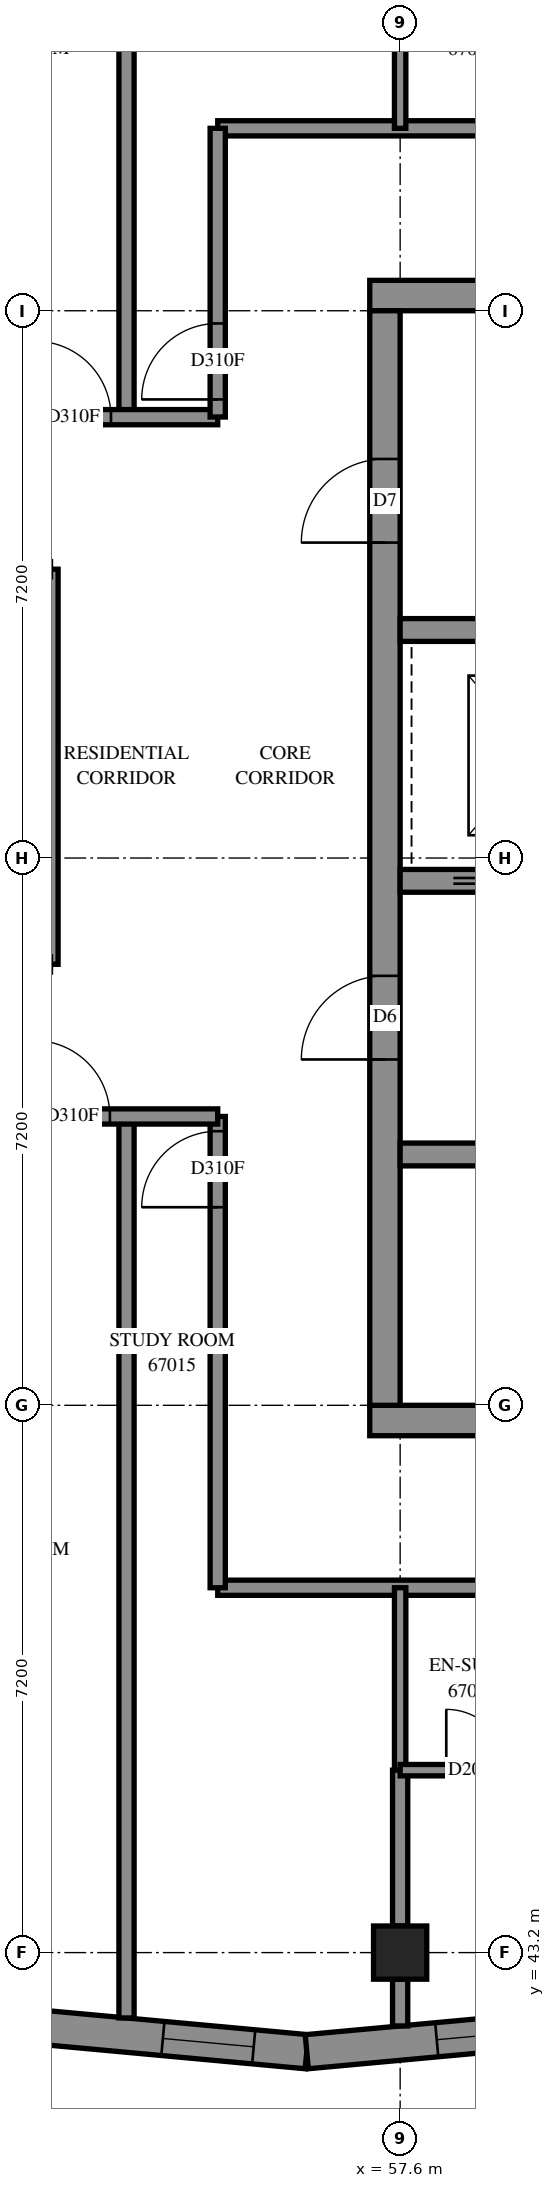
"""IFC4 building model, lengths in metres.
Left out: names, types, materials, properties, quantities, classifications, styles, units other than length and angle.
Written with IfcOpenShell. Run it as: python <this file> out.ifc"""

import sys

from ifc_helpers import new_model, si_unit, direction, frame, frame_2d, origin, origin_2d, place, context, subcontext, project, spatial, polyline, rectangle, outline, extrude, element, fill, save


model = new_model("IFC4")
c1 = context("Model", 3, precision=1e-05, world=origin(), true_north=direction((0.0, 1.0)))
c2 = subcontext(c1, "Body", "Model", "MODEL_VIEW")
j1 = project(units=[si_unit("LENGTHUNIT", "METRE"), si_unit("PLANEANGLEUNIT", "RADIAN")], contexts=[c1])
p1 = place(None, origin())
s1 = spatial("IfcSite", under=j1, at=p1, CompositionType="ELEMENT")
p2 = place(p1, origin())
s2 = spatial("IfcBuilding", under=s1, at=p2, CompositionType="ELEMENT")
p3 = place(p2, frame((0.0, 0.0, 247.2)))
s3 = spatial("IfcBuildingStorey", under=s2, at=p3, CompositionType="ELEMENT", Elevation=247.2)
p4 = place(p3, frame((57.6, 43.2, 0.0), z_axis=(0.0, 0.0, 1.0), x_axis=(1.0, 0.0, 0.0)))
e1 = element("IfcColumn", 1, at=p4, inside=s3, PredefinedType="COLUMN", context=c2, shape_type="SweptSolid", body=[
    extrude(rectangle(XDim=0.7, YDim=0.7, at=origin_2d()), origin(), (0.0, 0.0, 1.0), 3.1),
])
p5 = place(p3, frame((57.2, 50.2, -0.3), z_axis=(0.0, 0.0, 1.0), x_axis=(1.0, 0.0, 0.0)))
e2 = element("IfcWall", 2, at=p5, inside=s3, PredefinedType="SHEAR", context=c2, shape_type="SweptSolid", body=[
    extrude(rectangle(XDim=15.2, YDim=0.4, at=frame_2d((7.6, 0.0))), origin(), (0.0, 0.0, 1.0), 2.7),
])
p6 = place(p3, frame((57.2, 65.0, -0.3), z_axis=(0.0, 0.0, 1.0), x_axis=(1.0, 0.0, 0.0)))
e3 = element("IfcWall", 3, at=p6, inside=s3, PredefinedType="SHEAR", context=c2, shape_type="SweptSolid", body=[
    extrude(rectangle(XDim=15.2, YDim=0.4, at=frame_2d((7.6, 0.0))), origin(), (0.0, 0.0, 1.0), 2.7),
])
p7 = place(p6, frame((10.4, 0.0, 0.3)))
e4 = element("IfcOpeningElement", 4, at=p7, cuts=e3, PredefinedType="OPENING", context=c2, shape_type="SweptSolid", body=[
    extrude(rectangle(XDim=0.8, YDim=2.1, at=frame_2d((0.4, 1.05))), frame((0.0, 0.21, 0.0), z_axis=(0.0, -1.0, 0.0), x_axis=(1.0, 0.0, 0.0)), (0.0, 0.0, 1.0), 0.42),
])
p8 = place(p3, frame((57.4, 50.4, -0.3), z_axis=(0.0, 0.0, 1.0), x_axis=(0.0, 1.0, 0.0)))
e5 = element("IfcWall", 5, at=p8, inside=s3, PredefinedType="SHEAR", context=c2, shape_type="SweptSolid", body=[
    extrude(rectangle(XDim=14.4, YDim=0.4, at=frame_2d((7.2, 0.0))), origin(), (0.0, 0.0, 1.0), 2.7),
])
p9 = place(p8, frame((4.55, 0.0, 0.3)))
e6 = element("IfcOpeningElement", 6, at=p9, cuts=e5, PredefinedType="OPENING", context=c2, shape_type="SweptSolid", body=[
    extrude(rectangle(XDim=1.1, YDim=2.1, at=frame_2d((0.55, 1.05))), frame((0.0, 0.21, 0.0), z_axis=(0.0, -1.0, 0.0), x_axis=(1.0, 0.0, 0.0)), (0.0, 0.0, 1.0), 0.42),
])
p10 = place(p8, frame((11.35, 0.0, 0.3)))
e7 = element("IfcOpeningElement", 7, at=p10, cuts=e5, PredefinedType="OPENING", context=c2, shape_type="SweptSolid", body=[
    extrude(rectangle(XDim=1.1, YDim=2.1, at=frame_2d((0.55, 1.05))), frame((0.0, 0.21, 0.0), z_axis=(0.0, -1.0, 0.0), x_axis=(1.0, 0.0, 0.0)), (0.0, 0.0, 1.0), 0.42),
])
p11 = place(p3, frame((57.6, 53.7, 0.0), z_axis=(0.0, 0.0, 1.0), x_axis=(1.0, 0.0, 0.0)))
e8 = element("IfcWall", 8, at=p11, inside=s3, PredefinedType="SOLIDWALL", context=c2, shape_type="SweptSolid", body=[
    extrude(rectangle(XDim=14.4, YDim=0.3, at=frame_2d((7.2, 0.0))), origin(), (0.0, 0.0, 1.0), 3.1),
])
p12 = place(p11, frame((1.35, 0.0, 0.0)))
e9 = element("IfcOpeningElement", 9, at=p12, cuts=e8, PredefinedType="OPENING", context=c2, shape_type="SweptSolid", body=[
    extrude(rectangle(XDim=0.9, YDim=2.1, at=frame_2d((0.45, 1.05))), frame((0.0, 0.16, 0.0), z_axis=(0.0, -1.0, 0.0), x_axis=(1.0, 0.0, 0.0)), (0.0, 0.0, 1.0), 0.32),
])
p13 = place(p11, frame((4.95, 0.0, 0.0)))
e10 = element("IfcOpeningElement", 10, at=p13, cuts=e8, PredefinedType="OPENING", context=c2, shape_type="SweptSolid", body=[
    extrude(rectangle(XDim=0.9, YDim=2.1, at=frame_2d((0.45, 1.05))), frame((0.0, 0.16, 0.0), z_axis=(0.0, -1.0, 0.0), x_axis=(1.0, 0.0, 0.0)), (0.0, 0.0, 1.0), 0.32),
])
p14 = place(p11, frame((8.55, 0.0, 0.0)))
e11 = element("IfcOpeningElement", 11, at=p14, cuts=e8, PredefinedType="OPENING", context=c2, shape_type="SweptSolid", body=[
    extrude(rectangle(XDim=0.9, YDim=2.1, at=frame_2d((0.45, 1.05))), frame((0.0, 0.16, 0.0), z_axis=(0.0, -1.0, 0.0), x_axis=(1.0, 0.0, 0.0)), (0.0, 0.0, 1.0), 0.32),
])
p15 = place(p11, frame((12.05, 0.0, 0.0)))
e12 = element("IfcOpeningElement", 12, at=p15, cuts=e8, PredefinedType="OPENING", context=c2, shape_type="SweptSolid", body=[
    extrude(rectangle(XDim=1.1, YDim=2.1, at=frame_2d((0.55, 1.05))), frame((0.0, 0.16, 0.0), z_axis=(0.0, -1.0, 0.0), x_axis=(1.0, 0.0, 0.0)), (0.0, 0.0, 1.0), 0.32),
])
p16 = place(p3, frame((57.6, 57.3, 0.0), z_axis=(0.0, 0.0, 1.0), x_axis=(1.0, 0.0, 0.0)))
e13 = element("IfcWall", 13, at=p16, inside=s3, PredefinedType="SOLIDWALL", context=c2, shape_type="SweptSolid", body=[
    extrude(rectangle(XDim=14.4, YDim=0.3, at=frame_2d((7.2, 0.0))), origin(), (0.0, 0.0, 1.0), 3.1),
])
p17 = place(p16, frame((8.55, 0.0, 0.0)))
e14 = element("IfcOpeningElement", 14, at=p17, cuts=e13, PredefinedType="OPENING", context=c2, shape_type="SweptSolid", body=[
    extrude(rectangle(XDim=0.9, YDim=2.1, at=frame_2d((0.45, 1.05))), frame((0.0, 0.16, 0.0), z_axis=(0.0, -1.0, 0.0), x_axis=(1.0, 0.0, 0.0)), (0.0, 0.0, 1.0), 0.32),
])
p18 = place(p16, frame((1.25, 0.0, 0.0)))
e15 = element("IfcOpeningElement", 15, at=p18, cuts=e13, PredefinedType="OPENING", context=c2, shape_type="SweptSolid", body=[
    extrude(rectangle(XDim=1.1, YDim=2.1, at=frame_2d((0.55, 1.05))), frame((0.0, 0.16, 0.0), z_axis=(0.0, -1.0, 0.0), x_axis=(1.0, 0.0, 0.0)), (0.0, 0.0, 1.0), 0.32),
])
p19 = place(p16, frame((4.85, 0.0, 0.0)))
e16 = element("IfcOpeningElement", 16, at=p19, cuts=e13, PredefinedType="OPENING", context=c2, shape_type="SweptSolid", body=[
    extrude(rectangle(XDim=1.1, YDim=2.1, at=frame_2d((0.55, 1.05))), frame((0.0, 0.16, 0.0), z_axis=(0.0, -1.0, 0.0), x_axis=(1.0, 0.0, 0.0)), (0.0, 0.0, 1.0), 0.32),
])
p20 = place(p16, frame((12.05, 0.0, 0.0)))
e17 = element("IfcOpeningElement", 17, at=p20, cuts=e13, PredefinedType="OPENING", context=c2, shape_type="SweptSolid", body=[
    extrude(rectangle(XDim=1.1, YDim=2.1, at=frame_2d((0.55, 1.05))), frame((0.0, 0.16, 0.0), z_axis=(0.0, -1.0, 0.0), x_axis=(1.0, 0.0, 0.0)), (0.0, 0.0, 1.0), 0.32),
])
p21 = place(p3, frame((57.6, 60.6, 0.0), z_axis=(0.0, 0.0, 1.0), x_axis=(1.0, 0.0, 0.0)))
e18 = element("IfcWall", 18, at=p21, inside=s3, PredefinedType="SOLIDWALL", context=c2, shape_type="SweptSolid", body=[
    extrude(rectangle(XDim=7.2, YDim=0.3, at=frame_2d((3.6, 0.0))), origin(), (0.0, 0.0, 1.0), 3.1),
])
p22 = place(p3, frame((52.767, 42.228, 0.0), z_axis=(0.0, 0.0, 1.0), x_axis=(0.9957918129, -0.0916442329, 0.0)))
e19 = element("IfcWall", 19, at=p22, inside=s3, PredefinedType="SOLIDWALL", context=c2, shape_type="SweptSolid", body=[
    extrude(outline(polyline([(0.039, -0.225), (3.64, -0.225), (3.599, 0.225), (-0.039, 0.225), (0.039, -0.225)])), origin(), (0.0, 0.0, 1.0), 3.1),
])
p23 = place(p22, frame((1.718, 0.0, 0.45)))
e20 = element("IfcOpeningElement", 20, at=p23, cuts=e19, PredefinedType="OPENING", context=c2, shape_type="SweptSolid", body=[
    extrude(rectangle(XDim=1.2, YDim=2.55, at=frame_2d((0.6, 1.275))), frame((0.0, 0.235, 0.0), z_axis=(0.0, -1.0, 0.0), x_axis=(1.0, 0.0, 0.0)), (0.0, 0.0, 1.0), 0.47),
])
p24 = place(p3, frame((56.371, 41.896, 0.0), z_axis=(0.0, 0.0, 1.0), x_axis=(0.9957917474, 0.0916449443, 0.0)))
e21 = element("IfcWall", 21, at=p24, inside=s3, PredefinedType="SOLIDWALL", context=c2, shape_type="SweptSolid", body=[
    extrude(outline(polyline([(-0.021, -0.225), (3.58, -0.225), (3.622, 0.225), (0.021, 0.225), (-0.021, -0.225)])), origin(), (0.0, 0.0, 1.0), 3.1),
])
p25 = place(p24, frame((1.717, 0.0, 0.45)))
e22 = element("IfcOpeningElement", 22, at=p25, cuts=e21, PredefinedType="OPENING", context=c2, shape_type="SweptSolid", body=[
    extrude(rectangle(XDim=1.2, YDim=2.55, at=frame_2d((0.6, 1.275))), frame((0.0, 0.235, 0.0), z_axis=(0.0, -1.0, 0.0), x_axis=(1.0, 0.0, 0.0)), (0.0, 0.0, 1.0), 0.47),
])
p26 = place(p3, frame((55.2, 67.2, 0.0), z_axis=(0.0, 0.0, 1.0), x_axis=(1.0, 0.0, 0.0)))
e23 = element("IfcWall", 23, at=p26, inside=s3, PredefinedType="PARTITIONING", context=c2, shape_type="SweptSolid", body=[
    extrude(rectangle(XDim=19.2, YDim=0.2, at=frame_2d((9.6, 0.0))), origin(), (0.0, 0.0, 1.0), 3.1),
])
p27 = place(p26, frame((6.299, 0.0, 0.0)))
e24 = element("IfcOpeningElement", 24, at=p27, cuts=e23, PredefinedType="OPENING", context=c2, shape_type="SweptSolid", body=[
    extrude(rectangle(XDim=0.9, YDim=2.1, at=frame_2d((0.45, 1.05))), frame((0.0, 0.11, 0.0), z_axis=(0.0, -1.0, 0.0), x_axis=(1.0, 0.0, 0.0)), (0.0, 0.0, 1.0), 0.22),
])
p28 = place(p26, frame((13.65, 0.0, 0.0)))
e25 = element("IfcOpeningElement", 25, at=p28, cuts=e23, PredefinedType="OPENING", context=c2, shape_type="SweptSolid", body=[
    extrude(rectangle(XDim=0.9, YDim=2.1, at=frame_2d((0.45, 1.05))), frame((0.0, 0.11, 0.0), z_axis=(0.0, -1.0, 0.0), x_axis=(1.0, 0.0, 0.0)), (0.0, 0.0, 1.0), 0.22),
])
p29 = place(p3, frame((55.2, 48.0, 0.0), z_axis=(0.0, 0.0, 1.0), x_axis=(1.0, 0.0, 0.0)))
e26 = element("IfcWall", 26, at=p29, inside=s3, PredefinedType="PARTITIONING", context=c2, shape_type="SweptSolid", body=[
    extrude(rectangle(XDim=19.15, YDim=0.2, at=frame_2d((9.575, 0.0))), origin(), (0.0, 0.0, 1.0), 3.1),
])
p30 = place(p29, frame((6.299, 0.0, 0.0)))
e27 = element("IfcOpeningElement", 27, at=p30, cuts=e26, PredefinedType="OPENING", context=c2, shape_type="SweptSolid", body=[
    extrude(rectangle(XDim=0.9, YDim=2.1, at=frame_2d((0.45, 1.05))), frame((0.0, 0.11, 0.0), z_axis=(0.0, -1.0, 0.0), x_axis=(1.0, 0.0, 0.0)), (0.0, 0.0, 1.0), 0.22),
])
p31 = place(p29, frame((13.499, 0.0, 0.0)))
e28 = element("IfcOpeningElement", 28, at=p31, cuts=e26, PredefinedType="OPENING", context=c2, shape_type="SweptSolid", body=[
    extrude(rectangle(XDim=0.9, YDim=2.1, at=frame_2d((0.45, 1.05))), frame((0.0, 0.11, 0.0), z_axis=(0.0, -1.0, 0.0), x_axis=(1.0, 0.0, 0.0)), (0.0, 0.0, 1.0), 0.22),
])
p32 = place(p3, frame((54.0, 42.34, 0.0), z_axis=(0.0, 0.0, 1.0), x_axis=(0.0, 1.0, 0.0)))
e29 = element("IfcWall", 29, at=p32, inside=s3, PredefinedType="PARTITIONING", context=c2, shape_type="SweptSolid", body=[
    extrude(rectangle(XDim=11.86, YDim=0.2, at=frame_2d((5.93, 0.0))), origin(), (0.0, 0.0, 1.0), 3.1),
])
p33 = place(p3, frame((54.0, 63.4, 0.0), z_axis=(0.0, 0.0, 1.0), x_axis=(0.0, 1.0, 0.0)))
e30 = element("IfcWall", 30, at=p33, inside=s3, PredefinedType="PARTITIONING", context=c2, shape_type="SweptSolid", body=[
    extrude(rectangle(XDim=9.402, YDim=0.2, at=frame_2d((4.701, 0.0))), origin(), (0.0, 0.0, 1.0), 3.1),
])
p34 = place(p3, frame((55.2, 48.0, 0.0), z_axis=(0.0, 0.0, 1.0), x_axis=(0.0, 1.0, 0.0)))
e31 = element("IfcWall", 31, at=p34, inside=s3, PredefinedType="PARTITIONING", context=c2, shape_type="SweptSolid", body=[
    extrude(rectangle(XDim=6.2, YDim=0.2, at=frame_2d((3.1, 0.0))), origin(), (0.0, 0.0, 1.0), 3.1),
])
p35 = place(p34, frame((5.006, 0.0, 0.0)))
e32 = element("IfcOpeningElement", 32, at=p35, cuts=e31, PredefinedType="OPENING", context=c2, shape_type="SweptSolid", body=[
    extrude(rectangle(XDim=1.0, YDim=2.1, at=frame_2d((0.5, 1.05))), frame((0.0, 0.11, 0.0), z_axis=(0.0, -1.0, 0.0), x_axis=(1.0, 0.0, 0.0)), (0.0, 0.0, 1.0), 0.22),
])
p36 = place(p3, frame((53.0, 56.202, 0.0), z_axis=(0.0, 0.0, 1.0), x_axis=(0.0, 1.0, 0.0)))
e33 = element("IfcWall", 33, at=p36, inside=s3, PredefinedType="PARTITIONING", context=c2, shape_type="SweptSolid", body=[
    extrude(rectangle(XDim=5.198, YDim=0.2, at=frame_2d((2.599, 0.0))), origin(), (0.0, 0.0, 1.0), 3.1),
])
p37 = place(p3, frame((50.85, 54.2, 0.0), z_axis=(0.0, 0.0, 1.0), x_axis=(1.0, 0.0, 0.0)))
e34 = element("IfcWall", 34, at=p37, inside=s3, PredefinedType="PARTITIONING", context=c2, shape_type="SweptSolid", body=[
    extrude(rectangle(XDim=4.35, YDim=0.2, at=frame_2d((2.175, 0.0))), origin(), (0.0, 0.0, 1.0), 3.1),
])
p38 = place(p37, frame((1.931, 0.0, 0.0)))
e35 = element("IfcOpeningElement", 35, at=p38, cuts=e34, PredefinedType="OPENING", context=c2, shape_type="SweptSolid", body=[
    extrude(rectangle(XDim=1.0, YDim=2.1, at=frame_2d((0.5, 1.05))), frame((0.0, 0.11, 0.0), z_axis=(0.0, -1.0, 0.0), x_axis=(1.0, 0.0, 0.0)), (0.0, 0.0, 1.0), 0.22),
])
p39 = place(p3, frame((50.85, 63.4, 0.0), z_axis=(0.0, 0.0, 1.0), x_axis=(1.0, 0.0, 0.0)))
e36 = element("IfcWall", 36, at=p39, inside=s3, PredefinedType="PARTITIONING", context=c2, shape_type="SweptSolid", body=[
    extrude(rectangle(XDim=4.35, YDim=0.2, at=frame_2d((2.175, 0.0))), origin(), (0.0, 0.0, 1.0), 3.1),
])
p40 = place(p39, frame((1.946, 0.0, 0.0)))
e37 = element("IfcOpeningElement", 37, at=p40, cuts=e36, PredefinedType="OPENING", context=c2, shape_type="SweptSolid", body=[
    extrude(rectangle(XDim=1.0, YDim=2.1, at=frame_2d((0.5, 1.05))), frame((0.0, 0.11, 0.0), z_axis=(0.0, -1.0, 0.0), x_axis=(1.0, 0.0, 0.0)), (0.0, 0.0, 1.0), 0.22),
])
p41 = place(p3, frame((55.2, 63.402, 0.0), z_axis=(0.0, 0.0, 1.0), x_axis=(0.0, 1.0, 0.0)))
e38 = element("IfcWall", 38, at=p41, inside=s3, PredefinedType="PARTITIONING", context=c2, shape_type="SweptSolid", body=[
    extrude(rectangle(XDim=3.798, YDim=0.2, at=frame_2d((1.899, 0.0))), origin(), (0.0, 0.0, 1.0), 3.1),
])
p42 = place(p41, frame((0.231, 0.0, 0.0)))
e39 = element("IfcOpeningElement", 39, at=p42, cuts=e38, PredefinedType="OPENING", context=c2, shape_type="SweptSolid", body=[
    extrude(rectangle(XDim=1.0, YDim=2.1, at=frame_2d((0.5, 1.05))), frame((0.0, 0.11, 0.0), z_axis=(0.0, -1.0, 0.0), x_axis=(1.0, 0.0, 0.0)), (0.0, 0.0, 1.0), 0.22),
])
for number, where, z_axis, x_axis in (
    (40, (57.6, 45.6, 0.0), (0.0, 0.0, 1.0), (0.0, 1.0, 0.0)),
    (41, (57.6, 67.2, 0.0), (0.0, 0.0, 1.0), (0.0, 1.0, 0.0)),
):
    element("IfcWall", number, at=place(p3, frame(where, z_axis=z_axis, x_axis=x_axis)), inside=s3, PredefinedType="PARTITIONING", context=c2, shape_type="SweptSolid", body=[
        extrude(rectangle(XDim=2.4, YDim=0.15, at=frame_2d((1.2, 0.0))), origin(), (0.0, 0.0, 1.0), 3.1),
    ])
p43 = place(p3, frame((57.6, 43.55, 0.0), z_axis=(0.0, 0.0, 1.0), x_axis=(0.0, 1.0, 0.0)))
e42 = element("IfcWall", 42, at=p43, inside=s3, PredefinedType="PARTITIONING", context=c2, shape_type="SweptSolid", body=[
    extrude(rectangle(XDim=2.05, YDim=0.2, at=frame_2d((1.025, 0.0))), origin(), (0.0, 0.0, 1.0), 3.1),
])
p44 = place(p3, frame((57.6, 45.6, 0.0), z_axis=(0.0, 0.0, 1.0), x_axis=(1.0, 0.0, 0.0)))
e43 = element("IfcWall", 43, at=p44, inside=s3, PredefinedType="PARTITIONING", context=c2, shape_type="SweptSolid", body=[
    extrude(rectangle(XDim=1.9, YDim=0.15, at=frame_2d((0.95, 0.0))), origin(), (0.0, 0.0, 1.0), 3.1),
])
p45 = place(p44, frame((0.607, 0.0, 0.0)))
e44 = element("IfcOpeningElement", 44, at=p45, cuts=e43, PredefinedType="OPENING", context=c2, shape_type="SweptSolid", body=[
    extrude(rectangle(XDim=0.8, YDim=2.1, at=frame_2d((0.4, 1.05))), frame((0.0, 0.085, 0.0), z_axis=(0.0, -1.0, 0.0), x_axis=(1.0, 0.0, 0.0)), (0.0, 0.0, 1.0), 0.17),
])
p46 = place(p3, frame((57.6, 42.235, 0.0), z_axis=(0.0, 0.0, 1.0), x_axis=(0.0, 1.0, 0.0)))
e45 = element("IfcWall", 45, at=p46, inside=s3, PredefinedType="PARTITIONING", context=c2, shape_type="SweptSolid", body=[
    extrude(rectangle(XDim=0.615, YDim=0.2, at=frame_2d((0.307, 0.0))), origin(), (0.0, 0.0, 1.0), 3.1),
])
p47 = place(p23, origin())
e46 = element("IfcWindow", 46, at=p47, inside=s3, PartitioningType="SINGLE_PANEL", PredefinedType="WINDOW", context=c2, shape_type="SweptSolid", body=[
    extrude(rectangle(XDim=1.2, YDim=2.55, at=frame_2d((0.6, 1.275))), frame((0.0, 0.205, 0.0), z_axis=(0.0, -1.0, 0.0), x_axis=(1.0, 0.0, 0.0)), (0.0, 0.0, 1.0), 0.06),
])
fill(e20, e46)
p48 = place(p25, origin())
e47 = element("IfcWindow", 47, at=p48, inside=s3, PartitioningType="SINGLE_PANEL", PredefinedType="WINDOW", context=c2, shape_type="SweptSolid", body=[
    extrude(rectangle(XDim=1.2, YDim=2.55, at=frame_2d((0.6, 1.275))), frame((0.0, 0.205, 0.0), z_axis=(0.0, -1.0, 0.0), x_axis=(1.0, 0.0, 0.0)), (0.0, 0.0, 1.0), 0.06),
])
fill(e22, e47)
p49 = place(p9, origin())
e48 = element("IfcDoor", 48, at=p49, inside=s3, OperationType="DOUBLE_DOOR_SINGLE_SWING", PredefinedType="DOOR", context=c2, shape_type="SweptSolid", body=[
    extrude(rectangle(XDim=1.1, YDim=2.1, at=frame_2d((0.55, 1.05))), frame((0.0, 0.025, 0.0), z_axis=(0.0, -1.0, 0.0), x_axis=(1.0, 0.0, 0.0)), (0.0, 0.0, 1.0), 0.05),
])
fill(e6, e48)
p50 = place(p10, origin())
e49 = element("IfcDoor", 49, at=p50, inside=s3, OperationType="SINGLE_SWING_LEFT", PredefinedType="DOOR", context=c2, shape_type="SweptSolid", body=[
    extrude(rectangle(XDim=1.1, YDim=2.1, at=frame_2d((0.55, 1.05))), frame((0.0, 0.025, 0.0), z_axis=(0.0, -1.0, 0.0), x_axis=(1.0, 0.0, 0.0)), (0.0, 0.0, 1.0), 0.05),
])
fill(e7, e49)
p51 = place(p38, origin())
e50 = element("IfcDoor", 50, at=p51, inside=s3, OperationType="SINGLE_SWING_LEFT", PredefinedType="DOOR", context=c2, shape_type="SweptSolid", body=[
    extrude(rectangle(XDim=1.0, YDim=2.1, at=frame_2d((0.5, 1.05))), frame((0.0, 0.025, 0.0), z_axis=(0.0, -1.0, 0.0), x_axis=(1.0, 0.0, 0.0)), (0.0, 0.0, 1.0), 0.05),
])
fill(e35, e50)
p52 = place(p35, origin())
e51 = element("IfcDoor", 51, at=p52, inside=s3, OperationType="SINGLE_SWING_RIGHT", PredefinedType="DOOR", context=c2, shape_type="SweptSolid", body=[
    extrude(rectangle(XDim=1.0, YDim=2.1, at=frame_2d((0.5, 1.05))), frame((0.0, 0.025, 0.0), z_axis=(0.0, -1.0, 0.0), x_axis=(1.0, 0.0, 0.0)), (0.0, 0.0, 1.0), 0.05),
])
fill(e32, e51)
p53 = place(p45, origin())
e52 = element("IfcDoor", 52, at=p53, inside=s3, OperationType="SINGLE_SWING_RIGHT", PredefinedType="DOOR", context=c2, shape_type="SweptSolid", body=[
    extrude(rectangle(XDim=0.8, YDim=2.1, at=frame_2d((0.4, 1.05))), frame((0.0, 0.025, 0.0), z_axis=(0.0, -1.0, 0.0), x_axis=(1.0, 0.0, 0.0)), (0.0, 0.0, 1.0), 0.05),
])
fill(e44, e52)
p54 = place(p40, origin())
e53 = element("IfcDoor", 53, at=p54, inside=s3, OperationType="SINGLE_SWING_RIGHT", PredefinedType="DOOR", context=c2, shape_type="SweptSolid", body=[
    extrude(rectangle(XDim=1.0, YDim=2.1, at=frame_2d((0.5, 1.05))), frame((0.0, 0.025, 0.0), z_axis=(0.0, -1.0, 0.0), x_axis=(1.0, 0.0, 0.0)), (0.0, 0.0, 1.0), 0.05),
])
fill(e37, e53)
p55 = place(p42, origin())
e54 = element("IfcDoor", 54, at=p55, inside=s3, OperationType="SINGLE_SWING_LEFT", PredefinedType="DOOR", context=c2, shape_type="SweptSolid", body=[
    extrude(rectangle(XDim=1.0, YDim=2.1, at=frame_2d((0.5, 1.05))), frame((0.0, 0.025, 0.0), z_axis=(0.0, -1.0, 0.0), x_axis=(1.0, 0.0, 0.0)), (0.0, 0.0, 1.0), 0.05),
])
fill(e39, e54)
save(model, sys.argv[1])
